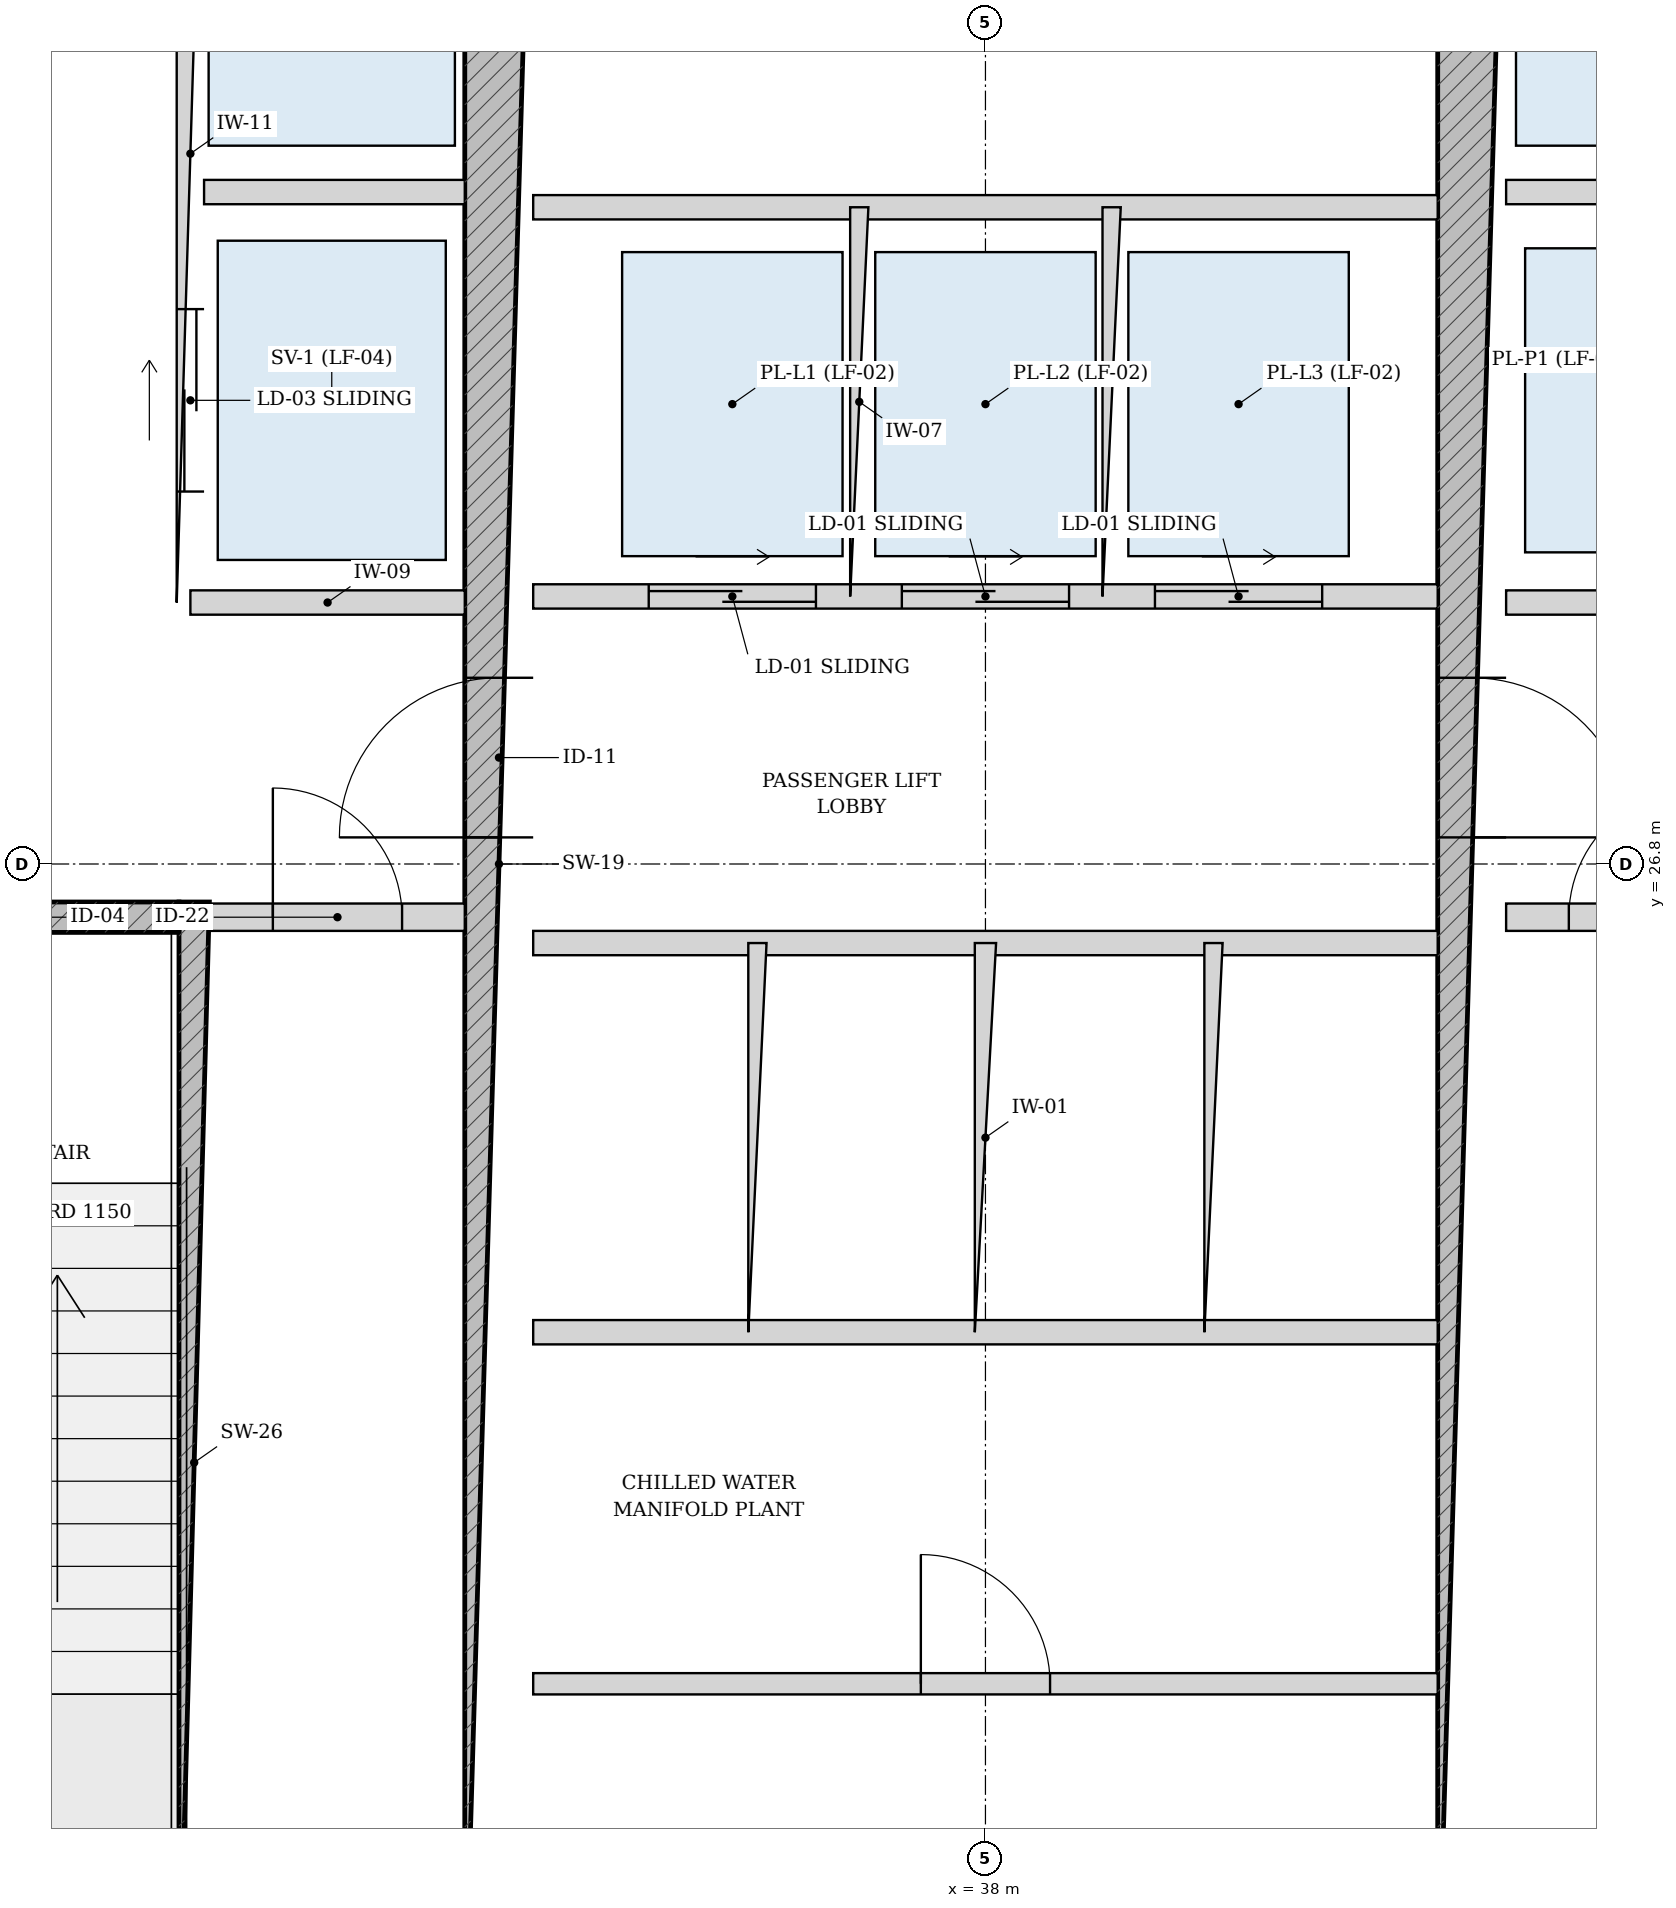
"""IFC4 building model, lengths in metres.
Left out: names, types, materials, properties, quantities, classifications, styles, units other than length and angle.
Written with IfcOpenShell. Run it as: python <this file> out.ifc"""

import sys

from ifc_helpers import new_model, si_unit, direction, frame, frame_2d, origin, place, context, subcontext, project, spatial, rectangle, extrude, source, transform, mapped, element, fill, save


model = new_model("IFC4")
c1 = context("Model", 3, precision=1e-05, world=origin(), true_north=direction((-0.2419218956, 0.970295726276)))
c2 = subcontext(c1, "Body", "Model", "MODEL_VIEW")
j1 = project(units=[si_unit("LENGTHUNIT", "METRE"), si_unit("PLANEANGLEUNIT", "RADIAN")], contexts=[c1])
p1 = place(None, origin())
s1 = spatial("IfcSite", under=j1, at=p1, CompositionType="ELEMENT")
p2 = place(p1, origin())
s2 = spatial("IfcBuilding", under=s1, at=p2, CompositionType="ELEMENT")
p3 = place(p2, frame((0.0, 0.0, 5.4)))
s3 = spatial("IfcBuildingStorey", under=s2, at=p3, CompositionType="ELEMENT", Elevation=5.4)
p4 = place(p3, frame((32.795, 19.175, 0.0), z_axis=(0.0, 0.0, 1.0), x_axis=(0.0, 1.0, 0.0)))
e1 = element("IfcWall", 1, at=p4, inside=s3, PredefinedType="SOLIDWALL", context=c2, shape_type="SweptSolid", body=[
    extrude(rectangle(XDim=7.375, YDim=0.2, at=frame_2d((3.688, 0.0))), origin(), (0.0, 0.0, 1.0), 4.2),
])
p5 = place(p3, frame((29.375, 26.45, 0.0), z_axis=(0.0, 0.0, 1.0), x_axis=(1.0, 0.0, 0.0)))
e2 = element("IfcWall", 2, at=p5, inside=s3, PredefinedType="SOLIDWALL", context=c2, shape_type="SweptSolid", body=[
    extrude(rectangle(XDim=3.32, YDim=0.2, at=frame_2d((1.66, 0.0))), origin(), (0.0, 0.0, 1.0), 4.2),
])
p6 = place(p5, frame((1.185, 0.0, 0.0)))
e3 = element("IfcOpeningElement", 3, at=p6, cuts=e2, PredefinedType="OPENING", context=c2, shape_type="SweptSolid", body=[
    extrude(rectangle(XDim=0.95, YDim=2.15, at=frame_2d((0.475, 1.075))), frame((0.0, 0.11, 0.0), z_axis=(0.0, -1.0, 0.0), x_axis=(1.0, 0.0, 0.0)), (0.0, 0.0, 1.0), 0.22),
])
p7 = place(p3, frame((34.8, 19.175, 0.0), z_axis=(0.0, 0.0, 1.0), x_axis=(0.0, 1.0, 0.0)))
e4 = element("IfcWall", 4, at=p7, inside=s3, PredefinedType="SHEAR", context=c2, shape_type="SweptSolid", body=[
    extrude(rectangle(XDim=15.25, YDim=0.45, at=frame_2d((7.625, 0.0))), origin(), (0.0, 0.0, 1.0), 4.2),
])
p8 = place(p7, frame((7.8, 0.0, 0.0)))
e5 = element("IfcOpeningElement", 5, at=p8, cuts=e4, PredefinedType="OPENING", context=c2, shape_type="SweptSolid", body=[
    extrude(rectangle(XDim=1.05, YDim=2.15, at=frame_2d((0.525, 1.075))), frame((0.0, 0.235, 0.0), z_axis=(0.0, -1.0, 0.0), x_axis=(1.0, 0.0, 0.0)), (0.0, 0.0, 1.0), 0.47),
])
p9 = place(p3, frame((41.2, 19.175, 0.0), z_axis=(0.0, 0.0, 1.0), x_axis=(0.0, 1.0, 0.0)))
e6 = element("IfcWall", 6, at=p9, inside=s3, PredefinedType="SHEAR", context=c2, shape_type="SweptSolid", body=[
    extrude(rectangle(XDim=15.25, YDim=0.45, at=frame_2d((7.625, 0.0))), origin(), (0.0, 0.0, 1.0), 4.2),
])
p10 = place(p9, frame((7.8, 0.0, 0.0)))
e7 = element("IfcOpeningElement", 7, at=p10, cuts=e6, PredefinedType="OPENING", context=c2, shape_type="SweptSolid", body=[
    extrude(rectangle(XDim=1.05, YDim=2.15, at=frame_2d((0.525, 1.075))), frame((0.0, 0.235, 0.0), z_axis=(0.0, -1.0, 0.0), x_axis=(1.0, 0.0, 0.0)), (0.0, 0.0, 1.0), 0.47),
])
p11 = place(p3, frame((32.9, 26.45, 0.0), z_axis=(0.0, 0.0, 1.0), x_axis=(1.0, 0.0, 0.0)))
e8 = element("IfcWall", 8, at=p11, inside=s3, PredefinedType="PARTITIONING", context=c2, shape_type="SweptSolid", body=[
    extrude(rectangle(XDim=1.675, YDim=0.18, at=frame_2d((0.837, 0.0))), origin(), (0.0, 0.0, 1.0), 4.2),
])
p12 = place(p11, frame((0.413, 0.0, 0.0)))
e9 = element("IfcOpeningElement", 9, at=p12, cuts=e8, PredefinedType="OPENING", context=c2, shape_type="SweptSolid", body=[
    extrude(rectangle(XDim=0.85, YDim=2.1, at=frame_2d((0.425, 1.05))), frame((0.0, 0.1, 0.0), z_axis=(0.0, -1.0, 0.0), x_axis=(1.0, 0.0, 0.0)), (0.0, 0.0, 1.0), 0.2),
])
p13 = place(p3, frame((41.425, 26.45, 0.0), z_axis=(0.0, 0.0, 1.0), x_axis=(1.0, 0.0, 0.0)))
e10 = element("IfcWall", 10, at=p13, inside=s3, PredefinedType="PARTITIONING", context=c2, shape_type="SweptSolid", body=[
    extrude(rectangle(XDim=1.675, YDim=0.18, at=frame_2d((0.837, 0.0))), origin(), (0.0, 0.0, 1.0), 4.2),
])
p14 = place(p13, frame((0.413, 0.0, 0.0)))
e11 = element("IfcOpeningElement", 11, at=p14, cuts=e10, PredefinedType="OPENING", context=c2, shape_type="SweptSolid", body=[
    extrude(rectangle(XDim=0.85, YDim=2.1, at=frame_2d((0.425, 1.05))), frame((0.0, 0.1, 0.0), z_axis=(0.0, -1.0, 0.0), x_axis=(1.0, 0.0, 0.0)), (0.0, 0.0, 1.0), 0.2),
])
p15 = place(p3, frame((32.77, 28.52, 0.0), z_axis=(0.0, 0.0, 1.0), x_axis=(0.0, 1.0, 0.0)))
e12 = element("IfcWall", 12, at=p15, inside=s3, PredefinedType="PARTITIONING", context=c2, shape_type="SweptSolid", body=[
    extrude(rectangle(XDim=5.905, YDim=0.18, at=frame_2d((2.953, 0.0))), origin(), (0.0, 0.0, 1.0), 4.2),
])
p16 = place(p15, frame((3.655, 0.0, 0.0)))
e13 = element("IfcOpeningElement", 13, at=p16, cuts=e12, PredefinedType="OPENING", context=c2, shape_type="SweptSolid", body=[
    extrude(rectangle(XDim=1.15, YDim=2.2, at=frame_2d((0.575, 1.1))), frame((0.0, 0.1, 0.0), z_axis=(0.0, -1.0, 0.0), x_axis=(1.0, 0.0, 0.0)), (0.0, 0.0, 1.0), 0.2),
])
p17 = place(p15, frame((0.73, 0.0, 0.0)))
e14 = element("IfcOpeningElement", 14, at=p17, cuts=e12, PredefinedType="OPENING", context=c2, shape_type="SweptSolid", body=[
    extrude(rectangle(XDim=1.2, YDim=2.25, at=frame_2d((0.6, 1.125))), frame((0.0, 0.1, 0.0), z_axis=(0.0, -1.0, 0.0), x_axis=(1.0, 0.0, 0.0)), (0.0, 0.0, 1.0), 0.2),
])
p18 = place(p3, frame((32.86, 31.22, 0.0), z_axis=(0.0, 0.0, 1.0), x_axis=(1.0, 0.0, 0.0)))
e15 = element("IfcWall", 15, at=p18, inside=s3, PredefinedType="PARTITIONING", context=c2, shape_type="SweptSolid", body=[
    extrude(rectangle(XDim=1.715, YDim=0.16, at=frame_2d((0.857, 0.0))), origin(), (0.0, 0.0, 1.0), 4.2),
])
p19 = place(p3, frame((32.77, 28.52, 0.0), z_axis=(0.0, 0.0, 1.0), x_axis=(1.0, 0.0, 0.0)))
e16 = element("IfcWall", 16, at=p19, inside=s3, PredefinedType="PARTITIONING", context=c2, shape_type="SweptSolid", body=[
    extrude(rectangle(XDim=1.805, YDim=0.16, at=frame_2d((0.902, 0.0))), origin(), (0.0, 0.0, 1.0), 4.2),
])
p20 = place(p3, frame((41.425, 31.22, 0.0), z_axis=(0.0, 0.0, 1.0), x_axis=(1.0, 0.0, 0.0)))
e17 = element("IfcWall", 17, at=p20, inside=s3, PredefinedType="PARTITIONING", context=c2, shape_type="SweptSolid", body=[
    extrude(rectangle(XDim=1.715, YDim=0.16, at=frame_2d((0.857, 0.0))), origin(), (0.0, 0.0, 1.0), 4.2),
])
p21 = place(p3, frame((41.425, 28.52, 0.0), z_axis=(0.0, 0.0, 1.0), x_axis=(1.0, 0.0, 0.0)))
e18 = element("IfcWall", 18, at=p21, inside=s3, PredefinedType="PARTITIONING", context=c2, shape_type="SweptSolid", body=[
    extrude(rectangle(XDim=1.805, YDim=0.16, at=frame_2d((0.902, 0.0))), origin(), (0.0, 0.0, 1.0), 4.2),
])
p22 = place(p3, frame((35.025, 28.56, 0.0), z_axis=(0.0, 0.0, 1.0), x_axis=(1.0, 0.0, 0.0)))
e19 = element("IfcWall", 19, at=p22, inside=s3, PredefinedType="PARTITIONING", context=c2, shape_type="SweptSolid", body=[
    extrude(rectangle(XDim=5.95, YDim=0.16, at=frame_2d((2.975, 0.0))), origin(), (0.0, 0.0, 1.0), 4.2),
])
p23 = place(p22, frame((0.76, 0.0, 0.0)))
e20 = element("IfcOpeningElement", 20, at=p23, cuts=e19, PredefinedType="OPENING", context=c2, shape_type="SweptSolid", body=[
    extrude(rectangle(XDim=1.1, YDim=2.2, at=frame_2d((0.55, 1.1))), frame((0.0, 0.09, 0.0), z_axis=(0.0, -1.0, 0.0), x_axis=(1.0, 0.0, 0.0)), (0.0, 0.0, 1.0), 0.18),
])
p24 = place(p22, frame((2.425, 0.0, 0.0)))
e21 = element("IfcOpeningElement", 21, at=p24, cuts=e19, PredefinedType="OPENING", context=c2, shape_type="SweptSolid", body=[
    extrude(rectangle(XDim=1.1, YDim=2.2, at=frame_2d((0.55, 1.1))), frame((0.0, 0.09, 0.0), z_axis=(0.0, -1.0, 0.0), x_axis=(1.0, 0.0, 0.0)), (0.0, 0.0, 1.0), 0.18),
])
p25 = place(p22, frame((4.09, 0.0, 0.0)))
e22 = element("IfcOpeningElement", 22, at=p25, cuts=e19, PredefinedType="OPENING", context=c2, shape_type="SweptSolid", body=[
    extrude(rectangle(XDim=1.1, YDim=2.2, at=frame_2d((0.55, 1.1))), frame((0.0, 0.09, 0.0), z_axis=(0.0, -1.0, 0.0), x_axis=(1.0, 0.0, 0.0)), (0.0, 0.0, 1.0), 0.18),
])
p26 = place(p3, frame((35.025, 31.12, 0.0), z_axis=(0.0, 0.0, 1.0), x_axis=(1.0, 0.0, 0.0)))
e23 = element("IfcWall", 23, at=p26, inside=s3, PredefinedType="PARTITIONING", context=c2, shape_type="SweptSolid", body=[
    extrude(rectangle(XDim=5.95, YDim=0.16, at=frame_2d((2.975, 0.0))), origin(), (0.0, 0.0, 1.0), 4.2),
])
for number, where, z_axis, x_axis in (
    (24, (37.17, 28.56, 0.0), (0.0, 0.0, 1.0), (0.0, 1.0, 0.0)),
    (25, (38.83, 28.56, 0.0), (0.0, 0.0, 1.0), (0.0, 1.0, 0.0)),
):
    element("IfcWall", number, at=place(p3, frame(where, z_axis=z_axis, x_axis=x_axis)), inside=s3, PredefinedType="PARTITIONING", context=c2, shape_type="SweptSolid", body=[
        extrude(rectangle(XDim=2.56, YDim=0.12, at=frame_2d((1.28, 0.0))), origin(), (0.0, 0.0, 1.0), 4.2),
    ])
for number, where, z_axis, x_axis in (
    (26, (35.025, 26.28, 0.0), (0.0, 0.0, 1.0), (1.0, 0.0, 0.0)),
    (27, (35.025, 23.72, 0.0), (0.0, 0.0, 1.0), (1.0, 0.0, 0.0)),
):
    element("IfcWall", number, at=place(p3, frame(where, z_axis=z_axis, x_axis=x_axis)), inside=s3, PredefinedType="PARTITIONING", context=c2, shape_type="SweptSolid", body=[
        extrude(rectangle(XDim=5.95, YDim=0.16, at=frame_2d((2.975, 0.0))), origin(), (0.0, 0.0, 1.0), 4.2),
    ])
p27 = place(p3, frame((36.5, 23.72, 0.0), z_axis=(0.0, 0.0, 1.0), x_axis=(0.0, 1.0, 0.0)))
e28 = element("IfcWall", 28, at=p27, inside=s3, PredefinedType="PARTITIONING", context=c2, shape_type="SweptSolid", body=[
    extrude(rectangle(XDim=2.56, YDim=0.12, at=frame_2d((1.28, 0.0))), origin(), (0.0, 0.0, 1.0), 4.2),
])
p28 = place(p3, frame((38.0, 23.72, 0.0), z_axis=(0.0, 0.0, 1.0), x_axis=(0.0, 1.0, 0.0)))
e29 = element("IfcWall", 29, at=p28, inside=s3, PredefinedType="PARTITIONING", context=c2, shape_type="SweptSolid", body=[
    extrude(rectangle(XDim=2.56, YDim=0.14, at=frame_2d((1.28, 0.0))), origin(), (0.0, 0.0, 1.0), 4.2),
])
p29 = place(p3, frame((39.5, 23.72, 0.0), z_axis=(0.0, 0.0, 1.0), x_axis=(0.0, 1.0, 0.0)))
e30 = element("IfcWall", 30, at=p29, inside=s3, PredefinedType="PARTITIONING", context=c2, shape_type="SweptSolid", body=[
    extrude(rectangle(XDim=2.56, YDim=0.12, at=frame_2d((1.28, 0.0))), origin(), (0.0, 0.0, 1.0), 4.2),
])
p30 = place(p3, frame((35.025, 21.407, 0.0), z_axis=(0.0, 0.0, 1.0), x_axis=(1.0, 0.0, 0.0)))
e31 = element("IfcWall", 31, at=p30, inside=s3, PredefinedType="PARTITIONING", context=c2, shape_type="SweptSolid", body=[
    extrude(rectangle(XDim=5.95, YDim=0.14, at=frame_2d((2.975, 0.0))), origin(), (0.0, 0.0, 1.0), 4.2),
])
p31 = place(p30, frame((2.55, 0.0, 0.0)))
e32 = element("IfcOpeningElement", 32, at=p31, cuts=e31, PredefinedType="OPENING", context=c2, shape_type="SweptSolid", body=[
    extrude(rectangle(XDim=0.85, YDim=2.1, at=frame_2d((0.425, 1.05))), frame((0.0, 0.08, 0.0), z_axis=(0.0, -1.0, 0.0), x_axis=(1.0, 0.0, 0.0)), (0.0, 0.0, 1.0), 0.16),
])
m1 = source(origin(), c2, "Body", "SweptSolid", [
    extrude(rectangle(XDim=1.05, YDim=2.15, at=frame_2d((0.525, 1.075))), frame((0.0, 0.025, 0.0), z_axis=(0.0, -1.0, 0.0), x_axis=(1.0, 0.0, 0.0)), (0.0, 0.0, 1.0), 0.05),
])
p32 = place(p8, origin())
e33 = element("IfcDoor", 33, at=p32, inside=s3, OperationType="SINGLE_SWING_LEFT", PredefinedType="DOOR", context=c2, shape_type="MappedRepresentation", body=[
    mapped(m1, transform((0.0, 0.0, 0.0), scale=1.0)),
])
fill(e5, e33)
p33 = place(p10, frame((1.05, 0.0, 0.0), z_axis=(0.0, 0.0, 1.0), x_axis=(-1.0, 0.0, 0.0)))
e34 = element("IfcDoor", 34, at=p33, inside=s3, OperationType="SINGLE_SWING_RIGHT", PredefinedType="DOOR", context=c2, shape_type="MappedRepresentation", body=[
    mapped(m1, transform((0.0, 0.0, 0.0), scale=1.0)),
])
fill(e7, e34)
m2 = source(origin(), c2, "Body", "SweptSolid", [
    extrude(rectangle(XDim=0.85, YDim=2.1, at=frame_2d((0.425, 1.05))), frame((0.0, 0.025, 0.0), z_axis=(0.0, -1.0, 0.0), x_axis=(1.0, 0.0, 0.0)), (0.0, 0.0, 1.0), 0.05),
])
p34 = place(p12, origin())
e35 = element("IfcDoor", 35, at=p34, inside=s3, OperationType="SINGLE_SWING_LEFT", PredefinedType="DOOR", context=c2, shape_type="MappedRepresentation", body=[
    mapped(m2, transform((0.0, 0.0, 0.0), scale=1.0)),
])
fill(e9, e35)
p35 = place(p14, origin())
e36 = element("IfcDoor", 36, at=p35, inside=s3, OperationType="SINGLE_SWING_RIGHT", PredefinedType="DOOR", context=c2, shape_type="MappedRepresentation", body=[
    mapped(m2, transform((0.0, 0.0, 0.0), scale=1.0)),
])
fill(e11, e36)
p36 = place(p31, origin())
e37 = element("IfcDoor", 37, at=p36, inside=s3, OperationType="SINGLE_SWING_LEFT", PredefinedType="DOOR", context=c2, shape_type="MappedRepresentation", body=[
    mapped(m2, transform((0.0, 0.0, 0.0), scale=1.0)),
])
fill(e32, e37)
m3 = source(origin(), c2, "Body", "SweptSolid", [
    extrude(rectangle(XDim=1.2, YDim=2.25, at=frame_2d((0.6, 1.125))), frame((0.0, 0.025, 0.0), z_axis=(0.0, -1.0, 0.0), x_axis=(1.0, 0.0, 0.0)), (0.0, 0.0, 1.0), 0.05),
])
p37 = place(p17, origin())
e38 = element("IfcDoor", 38, at=p37, inside=s3, OperationType="DOUBLE_DOOR_SLIDING", PredefinedType="DOOR", context=c2, shape_type="MappedRepresentation", body=[
    mapped(m3, transform((0.0, 0.0, 0.0), scale=1.0)),
])
fill(e14, e38)
m4 = source(origin(), c2, "Body", "SweptSolid", [
    extrude(rectangle(XDim=1.1, YDim=2.2, at=frame_2d((0.55, 1.1))), frame((0.0, 0.025, 0.0), z_axis=(0.0, -1.0, 0.0), x_axis=(1.0, 0.0, 0.0)), (0.0, 0.0, 1.0), 0.05),
])
p38 = place(p23, origin())
e39 = element("IfcDoor", 39, at=p38, inside=s3, OperationType="DOUBLE_DOOR_SLIDING", PredefinedType="DOOR", context=c2, shape_type="MappedRepresentation", body=[
    mapped(m4, transform((0.0, 0.0, 0.0), scale=1.0)),
])
fill(e20, e39)
p39 = place(p24, origin())
e40 = element("IfcDoor", 40, at=p39, inside=s3, OperationType="DOUBLE_DOOR_SLIDING", PredefinedType="DOOR", context=c2, shape_type="MappedRepresentation", body=[
    mapped(m4, transform((0.0, 0.0, 0.0), scale=1.0)),
])
fill(e21, e40)
p40 = place(p25, origin())
e41 = element("IfcDoor", 41, at=p40, inside=s3, OperationType="DOUBLE_DOOR_SLIDING", PredefinedType="DOOR", context=c2, shape_type="MappedRepresentation", body=[
    mapped(m4, transform((0.0, 0.0, 0.0), scale=1.0)),
])
fill(e22, e41)
save(model, sys.argv[1])
